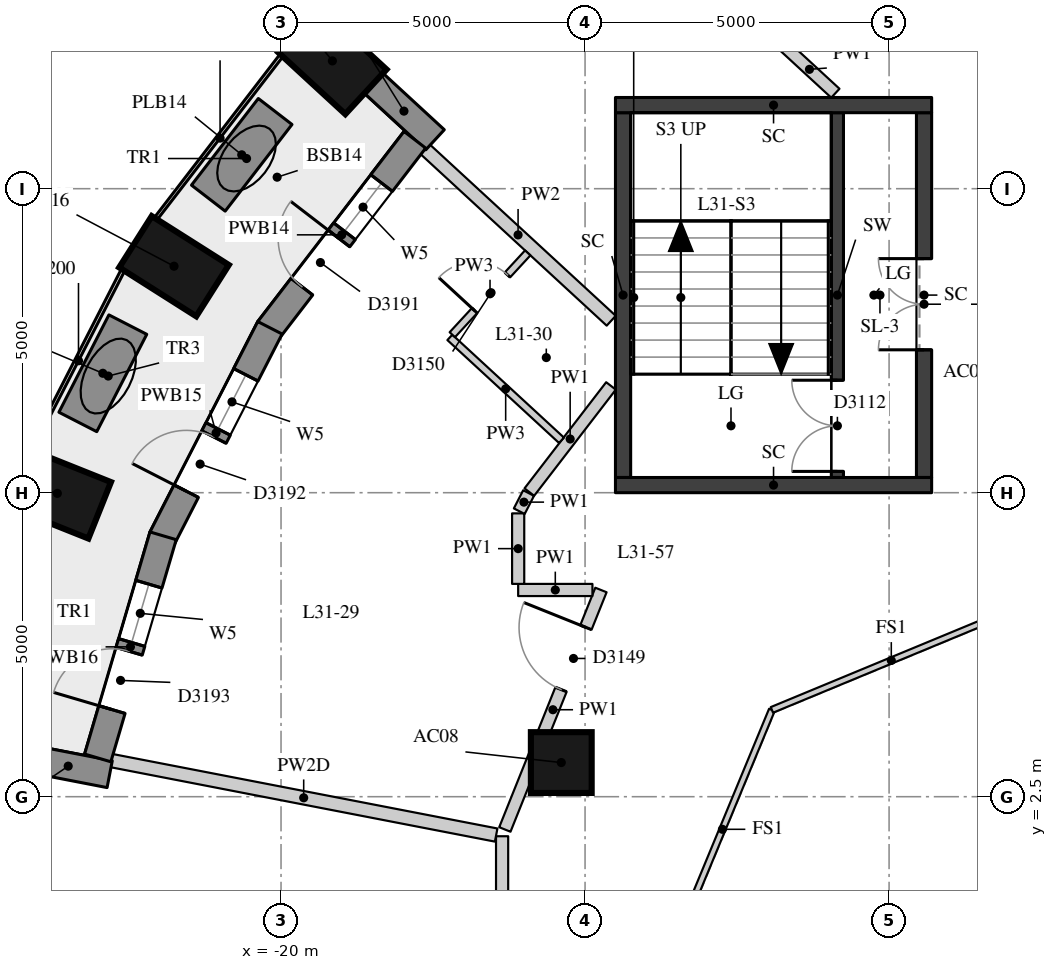
"""IFC4 building model, lengths in metres.
Left out: names, types, materials, properties, quantities, classifications, styles, units other than length and angle.
Written with IfcOpenShell. Run it as: python <this file> out.ifc"""

import sys

from ifc_helpers import new_model, si_unit, direction, frame, frame_2d, origin, origin_2d, place, context, subcontext, project, spatial, rectangle, extrude, element, fill, save


model = new_model("IFC4")
c1 = context("Model", 3, precision=1e-05, world=origin(), true_north=direction((0.0, 1.0)))
c2 = subcontext(c1, "Body", "Model", "MODEL_VIEW")
j1 = project(units=[si_unit("LENGTHUNIT", "METRE"), si_unit("PLANEANGLEUNIT", "RADIAN")], contexts=[c1])
p1 = place(None, origin())
s1 = spatial("IfcSite", under=j1, at=p1, CompositionType="ELEMENT")
p2 = place(p1, origin())
s2 = spatial("IfcBuilding", under=s1, at=p2, CompositionType="ELEMENT")
p3 = place(p2, frame((0.0, 0.0, 112.0)))
s3 = spatial("IfcBuildingStorey", under=s2, at=p3, CompositionType="ELEMENT", Elevation=112.0)
for number, where, z_axis, x_axis in (
    (1, (-19.156, 14.602, 0.0), (0.0, 0.0, 1.0), (-0.735, 0.678, 0.0)),
    (2, (-21.76, 11.225, 0.0), (0.0, 0.0, 1.0), (-0.845, 0.536, 0.0)),
    (3, (-23.679, 7.489, 0.0), (0.0, 0.0, 1.0), (-0.929, 0.371, 0.0)),
):
    element("IfcColumn", number, at=place(p3, frame(where, z_axis=z_axis, x_axis=x_axis)), inside=s3, PredefinedType="COLUMN", context=c2, shape_type="SweptSolid", body=[
        extrude(rectangle(XDim=1.5, YDim=1.0, at=origin_2d()), origin(), (0.0, 0.0, 1.0), 3.3),
    ])
p4 = place(p3, frame((-15.391, 3.062, 0.0), z_axis=(0.0, 0.0, 1.0), x_axis=(1.0, 0.0, 0.0)))
e4 = element("IfcColumn", 4, at=p4, inside=s3, PredefinedType="COLUMN", context=c2, shape_type="SweptSolid", body=[
    extrude(rectangle(XDim=1.0, YDim=1.0, at=origin_2d()), origin(), (0.0, 0.0, 1.0), 3.3),
])
p5 = place(p3, frame((-18.49, 14.247, 0.0), z_axis=(0.0, 0.0, 1.0), x_axis=(0.735307968822, -0.67773312667, 0.0)))
e5 = element("IfcWall", 5, at=p5, inside=s3, PredefinedType="SOLIDWALL", context=c2, shape_type="SweptSolid", body=[
    extrude(rectangle(XDim=1.391, YDim=0.45, at=frame_2d((0.695, 0.0))), origin(), (0.0, 0.0, 1.0), 3.02),
])
p6 = place(p3, frame((-24.183, 3.135, 0.0), z_axis=(0.0, 0.0, 1.0), x_axis=(0.981744955624, -0.190202108576, 0.0)))
e6 = element("IfcWall", 6, at=p6, inside=s3, PredefinedType="SOLIDWALL", context=c2, shape_type="SweptSolid", body=[
    extrude(rectangle(XDim=1.39, YDim=0.45, at=frame_2d((0.695, 0.0))), origin(), (0.0, 0.0, 1.0), 2.47),
])
p7 = place(p3, frame((-17.799, 13.304, 0.0), z_axis=(0.0, 0.0, 1.0), x_axis=(-0.609698797728, -0.792633191362, 0.0)))
e7 = element("IfcWall", 7, at=p7, inside=s3, PredefinedType="SOLIDWALL", context=c2, shape_type="SweptSolid", body=[
    extrude(rectangle(XDim=3.945, YDim=0.45, at=frame_2d((1.973, 0.0))), origin(), (0.0, 0.0, 1.0), 3.02),
])
p8 = place(p7, frame((0.897, 0.0, 0.4)))
e8 = element("IfcOpeningElement", 8, at=p8, cuts=e7, PredefinedType="OPENING", context=c2, shape_type="SweptSolid", body=[
    extrude(rectangle(XDim=1.0, YDim=1.75, at=frame_2d((0.5, 0.875))), frame((0.0, 0.235, 0.0), z_axis=(0.0, -1.0, 0.0), x_axis=(1.0, 0.0, 0.0)), (0.0, 0.0, 1.0), 0.47),
])
p9 = place(p7, frame((2.047, 0.0, 0.0)))
e9 = element("IfcOpeningElement", 9, at=p9, cuts=e7, PredefinedType="OPENING", context=c2, shape_type="SweptSolid", body=[
    extrude(rectangle(XDim=1.0, YDim=2.15, at=frame_2d((0.5, 1.075))), frame((0.0, 0.235, 0.0), z_axis=(0.0, -1.0, 0.0), x_axis=(1.0, 0.0, 0.0)), (0.0, 0.0, 1.0), 0.47),
])
p10 = place(p3, frame((-20.182, 10.212, 0.0), z_axis=(0.0, 0.0, 1.0), x_axis=(-0.455932890657, -0.890014156751, 0.0)))
e10 = element("IfcWall", 10, at=p10, inside=s3, PredefinedType="SOLIDWALL", context=c2, shape_type="SweptSolid", body=[
    extrude(rectangle(XDim=3.888, YDim=0.45, at=frame_2d((1.944, 0.0))), origin(), (0.0, 0.0, 1.0), 3.02),
])
p11 = place(p10, frame((0.869, 0.0, 0.4)))
e11 = element("IfcOpeningElement", 11, at=p11, cuts=e10, PredefinedType="OPENING", context=c2, shape_type="SweptSolid", body=[
    extrude(rectangle(XDim=1.0, YDim=1.75, at=frame_2d((0.5, 0.875))), frame((0.0, 0.235, 0.0), z_axis=(0.0, -1.0, 0.0), x_axis=(1.0, 0.0, 0.0)), (0.0, 0.0, 1.0), 0.47),
])
p12 = place(p10, frame((2.019, 0.0, 0.0)))
e12 = element("IfcOpeningElement", 12, at=p12, cuts=e10, PredefinedType="OPENING", context=c2, shape_type="SweptSolid", body=[
    extrude(rectangle(XDim=1.0, YDim=2.15, at=frame_2d((0.5, 1.075))), frame((0.0, 0.235, 0.0), z_axis=(0.0, -1.0, 0.0), x_axis=(1.0, 0.0, 0.0)), (0.0, 0.0, 1.0), 0.47),
])
p13 = place(p3, frame((-21.939, 6.791, 0.0), z_axis=(0.0, 0.0, 1.0), x_axis=(-0.282350284167, -0.959311376473, 0.0)))
e13 = element("IfcWall", 13, at=p13, inside=s3, PredefinedType="SOLIDWALL", context=c2, shape_type="SweptSolid", body=[
    extrude(rectangle(XDim=3.808, YDim=0.45, at=frame_2d((1.904, 0.0))), origin(), (0.0, 0.0, 1.0), 3.02),
])
p14 = place(p13, frame((0.829, 0.0, 0.4)))
e14 = element("IfcOpeningElement", 14, at=p14, cuts=e13, PredefinedType="OPENING", context=c2, shape_type="SweptSolid", body=[
    extrude(rectangle(XDim=1.0, YDim=1.75, at=frame_2d((0.5, 0.875))), frame((0.0, 0.235, 0.0), z_axis=(0.0, -1.0, 0.0), x_axis=(1.0, 0.0, 0.0)), (0.0, 0.0, 1.0), 0.47),
])
p15 = place(p13, frame((1.979, 0.0, 0.0)))
e15 = element("IfcOpeningElement", 15, at=p15, cuts=e13, PredefinedType="OPENING", context=c2, shape_type="SweptSolid", body=[
    extrude(rectangle(XDim=1.0, YDim=2.15, at=frame_2d((0.5, 1.075))), frame((0.0, 0.235, 0.0), z_axis=(0.0, -1.0, 0.0), x_axis=(1.0, 0.0, 0.0)), (0.0, 0.0, 1.0), 0.47),
])
p16 = place(p3, frame((-20.096, 13.77, 0.0), z_axis=(0.0, 0.0, 1.0), x_axis=(-0.610752434717, -0.791821610899, 0.0)))
e16 = element("IfcWall", 16, at=p16, inside=s3, PredefinedType="USERDEFINED", context=c2, shape_type="SweptSolid", body=[
    extrude(rectangle(XDim=1.8, YDim=0.7, at=frame_2d((0.9, 0.0))), origin(), (0.0, 0.0, 1.0), 0.75),
])
p17 = place(p3, frame((-22.52, 10.265, 0.0), z_axis=(0.0, 0.0, 1.0), x_axis=(-0.456845298981, -0.88954616114, 0.0)))
e17 = element("IfcWall", 17, at=p17, inside=s3, PredefinedType="USERDEFINED", context=c2, shape_type="SweptSolid", body=[
    extrude(rectangle(XDim=1.8, YDim=0.7, at=frame_2d((0.9, 0.0))), origin(), (0.0, 0.0, 1.0), 0.75),
])
p18 = place(p3, frame((-10.85, 7.75, 0.0), z_axis=(0.0, 0.0, 1.0), x_axis=(0.0, 1.0, 0.0)))
e18 = element("IfcWall", 18, at=p18, inside=s3, PredefinedType="SHEAR", context=c2, shape_type="SweptSolid", body=[
    extrude(rectangle(XDim=6.0, YDim=0.2, at=frame_2d((3.0, 0.0))), origin(), (0.0, 0.0, 1.0), 3.02),
])
p19 = place(p18, frame((0.1, 0.0, 0.0)))
e19 = element("IfcOpeningElement", 19, at=p19, cuts=e18, PredefinedType="OPENING", context=c2, shape_type="SweptSolid", body=[
    extrude(rectangle(XDim=1.5, YDim=2.1, at=frame_2d((0.75, 1.05))), frame((0.0, 0.11, 0.0), z_axis=(0.0, -1.0, 0.0), x_axis=(1.0, 0.0, 0.0)), (0.0, 0.0, 1.0), 0.22),
])
p20 = place(p3, frame((-14.375, 7.75, -0.28), z_axis=(0.0, 0.0, 1.0), x_axis=(0.0, 1.0, 0.0)))
e20 = element("IfcWall", 20, at=p20, inside=s3, PredefinedType="SHEAR", context=c2, shape_type="SweptSolid", body=[
    extrude(rectangle(XDim=6.0, YDim=0.25, at=frame_2d((3.0, 0.0))), origin(), (0.0, 0.0, 1.0), 3.3),
])
p21 = place(p3, frame((-9.425, 7.75, -0.28), z_axis=(0.0, 0.0, 1.0), x_axis=(0.0, 1.0, 0.0)))
e21 = element("IfcWall", 21, at=p21, inside=s3, PredefinedType="SHEAR", context=c2, shape_type="SweptSolid", body=[
    extrude(rectangle(XDim=6.0, YDim=0.25, at=frame_2d((3.0, 0.0))), origin(), (0.0, 0.0, 1.0), 3.3),
])
p22 = place(p21, frame((2.1, 0.0, 0.28)))
e22 = element("IfcOpeningElement", 22, at=p22, cuts=e21, PredefinedType="OPENING", context=c2, shape_type="SweptSolid", body=[
    extrude(rectangle(XDim=1.5, YDim=2.1, at=frame_2d((0.75, 1.05))), frame((0.0, 0.135, 0.0), z_axis=(0.0, -1.0, 0.0), x_axis=(1.0, 0.0, 0.0)), (0.0, 0.0, 1.0), 0.27),
])
for number, where, z_axis, x_axis in (
    (23, (-14.5, 13.875, -0.28), (0.0, 0.0, 1.0), (1.0, 0.0, 0.0)),
    (24, (-14.5, 7.625, -0.28), (0.0, 0.0, 1.0), (1.0, 0.0, 0.0)),
):
    element("IfcWall", number, at=place(p3, frame(where, z_axis=z_axis, x_axis=x_axis)), inside=s3, PredefinedType="SHEAR", context=c2, shape_type="SweptSolid", body=[
        extrude(rectangle(XDim=5.2, YDim=0.25, at=frame_2d((2.6, 0.0))), origin(), (0.0, 0.0, 1.0), 3.3),
    ])
p23 = place(p3, frame((-16.364, -2.95, 0.0), z_axis=(0.0, 0.0, 1.0), x_axis=(0.0, 1.0, 0.0)))
e25 = element("IfcWall", 25, at=p23, inside=s3, PredefinedType="PARTITIONING", context=c2, shape_type="SweptSolid", body=[
    extrude(rectangle(XDim=4.799, YDim=0.2, at=frame_2d((2.4, 0.0))), origin(), (0.0, 0.0, 1.0), 2.52),
])
p24 = place(p23, frame((0.835, 0.0, 0.0)))
e26 = element("IfcOpeningElement", 26, at=p24, cuts=e25, PredefinedType="OPENING", context=c2, shape_type="SweptSolid", body=[
    extrude(rectangle(XDim=0.9, YDim=2.1, at=frame_2d((0.45, 1.05))), frame((0.0, 0.11, 0.0), z_axis=(0.0, -1.0, 0.0), x_axis=(1.0, 0.0, 0.0)), (0.0, 0.0, 1.0), 0.22),
])
p25 = place(p3, frame((-16.319, 1.961, 0.0), z_axis=(0.0, 0.0, 1.0), x_axis=(0.372352515432, 0.928091377102, 0.0)))
e27 = element("IfcWall", 27, at=p25, inside=s3, PredefinedType="PARTITIONING", context=c2, shape_type="SweptSolid", body=[
    extrude(rectangle(XDim=4.244, YDim=0.2, at=frame_2d((2.122, 0.0))), origin(), (0.0, 0.0, 1.0), 3.02),
])
p26 = place(p25, frame((2.481, 0.0, 0.0)))
e28 = element("IfcOpeningElement", 28, at=p26, cuts=e27, PredefinedType="OPENING", context=c2, shape_type="SweptSolid", body=[
    extrude(rectangle(XDim=1.1, YDim=2.1, at=frame_2d((0.55, 1.05))), frame((0.0, 0.11, 0.0), z_axis=(0.0, -1.0, 0.0), x_axis=(1.0, 0.0, 0.0)), (0.0, 0.0, 1.0), 0.22),
])
p27 = place(p3, frame((-14.879, 5.9, 0.0), z_axis=(0.0, 0.0, 1.0), x_axis=(-1.0, 0.0, 0.0)))
e29 = element("IfcWall", 29, at=p27, inside=s3, PredefinedType="PARTITIONING", context=c2, shape_type="SweptSolid", body=[
    extrude(rectangle(XDim=1.221, YDim=0.2, at=frame_2d((0.611, 0.0))), origin(), (0.0, 0.0, 1.0), 3.02),
])
p28 = place(p3, frame((-16.1, 6.0, 0.0), z_axis=(0.0, 0.0, 1.0), x_axis=(0.0, 1.0, 0.0)))
e30 = element("IfcWall", 30, at=p28, inside=s3, PredefinedType="PARTITIONING", context=c2, shape_type="SweptSolid", body=[
    extrude(rectangle(XDim=1.16, YDim=0.2, at=frame_2d((0.58, 0.0))), origin(), (0.0, 0.0, 1.0), 3.02),
])
p29 = place(p3, frame((-16.082, 7.196, 0.0), z_axis=(0.0, 0.0, 1.0), x_axis=(0.456789128428, 0.889575006478, 0.0)))
e31 = element("IfcWall", 31, at=p29, inside=s3, PredefinedType="PARTITIONING", context=c2, shape_type="SweptSolid", body=[
    extrude(rectangle(XDim=0.336, YDim=0.2, at=frame_2d((0.168, 0.0))), origin(), (0.0, 0.0, 1.0), 3.02),
])
p30 = place(p3, frame((-15.917, 7.51, 0.0), z_axis=(0.0, 0.0, 1.0), x_axis=(0.609673267649, 0.792652828617, 0.0)))
e32 = element("IfcWall", 32, at=p30, inside=s3, PredefinedType="PARTITIONING", context=c2, shape_type="SweptSolid", body=[
    extrude(rectangle(XDim=2.203, YDim=0.2, at=frame_2d((1.102, 0.0))), origin(), (0.0, 0.0, 1.0), 3.02),
])
p31 = place(p3, frame((-10.883, 14.07, 0.0), z_axis=(0.0, 0.0, 1.0), x_axis=(-0.735263405477, 0.677781472575, 0.0)))
e33 = element("IfcWall", 33, at=p31, inside=s3, PredefinedType="PARTITIONING", context=c2, shape_type="SweptSolid", body=[
    extrude(rectangle(XDim=1.159, YDim=0.2, at=frame_2d((0.58, 0.0))), origin(), (0.0, 0.0, 1.0), 3.02),
])
p32 = place(p3, frame((-17.633, 13.151, 0.0), z_axis=(0.0, 0.0, 1.0), x_axis=(0.73535370522, -0.677683501511, 0.0)))
e34 = element("IfcWall", 34, at=p32, inside=s3, PredefinedType="PARTITIONING", context=c2, shape_type="SweptSolid", body=[
    extrude(rectangle(XDim=4.166, YDim=0.22, at=frame_2d((2.083, 0.0))), origin(), (0.0, 0.0, 1.0), 3.02),
])
p33 = place(p3, frame((-22.793, 3.095, 0.0), z_axis=(0.0, 0.0, 1.0), x_axis=(0.981772102901, -0.190061931918, 0.0)))
e35 = element("IfcWall", 35, at=p33, inside=s3, PredefinedType="PARTITIONING", context=c2, shape_type="SweptSolid", body=[
    extrude(rectangle(XDim=6.448, YDim=0.22, at=frame_2d((3.224, 0.0))), origin(), (0.0, 0.0, 1.0), 2.47),
])
p34 = place(p3, frame((-15.387, 8.362, 0.0), z_axis=(0.0, 0.0, 1.0), x_axis=(-0.735313004993, 0.677727662626, 0.0)))
e36 = element("IfcWall", 36, at=p34, inside=s3, PredefinedType="PARTITIONING", context=c2, shape_type="SweptSolid", body=[
    extrude(rectangle(XDim=2.497, YDim=0.12, at=frame_2d((1.249, 0.0))), origin(), (0.0, 0.0, 1.0), 3.02),
])
p35 = place(p3, frame((-17.183, 10.098, 0.0), z_axis=(0.0, 0.0, 1.0), x_axis=(0.677631502542, 0.735401622763, 0.0)))
e37 = element("IfcWall", 37, at=p35, inside=s3, PredefinedType="PARTITIONING", context=c2, shape_type="SweptSolid", body=[
    extrude(rectangle(XDim=1.83, YDim=0.12, at=frame_2d((0.915, 0.0))), origin(), (0.0, 0.0, 1.0), 3.02),
])
p36 = place(p35, frame((0.54, 0.0, 0.0)))
e38 = element("IfcOpeningElement", 38, at=p36, cuts=e37, PredefinedType="OPENING", context=c2, shape_type="SweptSolid", body=[
    extrude(rectangle(XDim=0.8, YDim=2.1, at=frame_2d((0.4, 1.05))), frame((0.0, 0.07, 0.0), z_axis=(0.0, -1.0, 0.0), x_axis=(1.0, 0.0, 0.0)), (0.0, 0.0, 1.0), 0.14),
])
for number, where, z_axis, x_axis in (
    (39, (-13.554, 0.0, 0.0), (0.0, 0.0, 1.0), (0.383, 0.924, 0.0)),
    (40, (-11.927, 3.927, 0.0), (0.0, 0.0, 1.0), (0.924, 0.383, 0.0)),
):
    element("IfcWall", number, at=place(p3, frame(where, z_axis=z_axis, x_axis=x_axis)), inside=s3, PredefinedType="PARTITIONING", context=c2, shape_type="SweptSolid", body=[
        extrude(rectangle(XDim=4.251, YDim=0.1, at=frame_2d((2.125, 0.0))), origin(), (0.0, 0.0, 1.0), 3.02),
    ])
p37 = place(p8, origin())
e41 = element("IfcWindow", 41, at=p37, inside=s3, PartitioningType="SINGLE_PANEL", PredefinedType="WINDOW", context=c2, shape_type="SweptSolid", body=[
    extrude(rectangle(XDim=1.0, YDim=1.75, at=frame_2d((0.5, 0.875))), frame((0.0, 0.035, 0.0), z_axis=(0.0, -1.0, 0.0), x_axis=(1.0, 0.0, 0.0)), (0.0, 0.0, 1.0), 0.06),
])
fill(e8, e41)
p38 = place(p9, frame((1.0, 0.0, 0.0), z_axis=(0.0, 0.0, 1.0), x_axis=(-1.0, 0.0, 0.0)))
e42 = element("IfcDoor", 42, at=p38, inside=s3, OperationType="SINGLE_SWING_RIGHT", PredefinedType="DOOR", context=c2, shape_type="SweptSolid", body=[
    extrude(rectangle(XDim=1.0, YDim=2.15, at=frame_2d((0.5, 1.075))), frame((0.0, 0.075, 0.0), z_axis=(0.0, -1.0, 0.0), x_axis=(1.0, 0.0, 0.0)), (0.0, 0.0, 1.0), 0.05),
])
fill(e9, e42)
p39 = place(p11, origin())
e43 = element("IfcWindow", 43, at=p39, inside=s3, PartitioningType="SINGLE_PANEL", PredefinedType="WINDOW", context=c2, shape_type="SweptSolid", body=[
    extrude(rectangle(XDim=1.0, YDim=1.75, at=frame_2d((0.5, 0.875))), frame((0.0, 0.035, 0.0), z_axis=(0.0, -1.0, 0.0), x_axis=(1.0, 0.0, 0.0)), (0.0, 0.0, 1.0), 0.06),
])
fill(e11, e43)
p40 = place(p12, frame((1.0, 0.0, 0.0), z_axis=(0.0, 0.0, 1.0), x_axis=(-1.0, 0.0, 0.0)))
e44 = element("IfcDoor", 44, at=p40, inside=s3, OperationType="SINGLE_SWING_LEFT", PredefinedType="DOOR", context=c2, shape_type="SweptSolid", body=[
    extrude(rectangle(XDim=1.0, YDim=2.15, at=frame_2d((0.5, 1.075))), frame((0.0, 0.075, 0.0), z_axis=(0.0, -1.0, 0.0), x_axis=(1.0, 0.0, 0.0)), (0.0, 0.0, 1.0), 0.05),
])
fill(e12, e44)
p41 = place(p14, origin())
e45 = element("IfcWindow", 45, at=p41, inside=s3, PartitioningType="SINGLE_PANEL", PredefinedType="WINDOW", context=c2, shape_type="SweptSolid", body=[
    extrude(rectangle(XDim=1.0, YDim=1.75, at=frame_2d((0.5, 0.875))), frame((0.0, 0.035, 0.0), z_axis=(0.0, -1.0, 0.0), x_axis=(1.0, 0.0, 0.0)), (0.0, 0.0, 1.0), 0.06),
])
fill(e14, e45)
p42 = place(p15, frame((1.0, 0.0, 0.0), z_axis=(0.0, 0.0, 1.0), x_axis=(-1.0, 0.0, 0.0)))
e46 = element("IfcDoor", 46, at=p42, inside=s3, OperationType="SINGLE_SWING_LEFT", PredefinedType="DOOR", context=c2, shape_type="SweptSolid", body=[
    extrude(rectangle(XDim=1.0, YDim=2.15, at=frame_2d((0.5, 1.075))), frame((0.0, 0.075, 0.0), z_axis=(0.0, -1.0, 0.0), x_axis=(1.0, 0.0, 0.0)), (0.0, 0.0, 1.0), 0.05),
])
fill(e15, e46)
p43 = place(p19, origin())
e47 = element("IfcDoor", 47, at=p43, inside=s3, OperationType="DOUBLE_DOOR_SINGLE_SWING", PredefinedType="DOOR", context=c2, shape_type="SweptSolid", body=[
    extrude(rectangle(XDim=1.5, YDim=2.1, at=frame_2d((0.75, 1.05))), frame((0.0, 0.025, 0.0), z_axis=(0.0, -1.0, 0.0), x_axis=(1.0, 0.0, 0.0)), (0.0, 0.0, 1.0), 0.05),
])
fill(e19, e47)
p44 = place(p22, origin())
e48 = element("IfcDoor", 48, at=p44, inside=s3, OperationType="DOUBLE_DOOR_SINGLE_SWING", PredefinedType="DOOR", context=c2, shape_type="SweptSolid", body=[
    extrude(rectangle(XDim=1.5, YDim=2.1, at=frame_2d((0.75, 1.05))), frame((0.0, 0.025, 0.0), z_axis=(0.0, -1.0, 0.0), x_axis=(1.0, 0.0, 0.0)), (0.0, 0.0, 1.0), 0.05),
])
fill(e22, e48)
p45 = place(p26, origin())
e49 = element("IfcDoor", 49, at=p45, inside=s3, OperationType="SINGLE_SWING_RIGHT", PredefinedType="DOOR", context=c2, shape_type="SweptSolid", body=[
    extrude(rectangle(XDim=1.1, YDim=2.1, at=frame_2d((0.55, 1.05))), frame((0.0, 0.025, 0.0), z_axis=(0.0, -1.0, 0.0), x_axis=(1.0, 0.0, 0.0)), (0.0, 0.0, 1.0), 0.05),
])
fill(e28, e49)
p46 = place(p36, origin())
e50 = element("IfcDoor", 50, at=p46, inside=s3, OperationType="SINGLE_SWING_LEFT", PredefinedType="DOOR", context=c2, shape_type="SweptSolid", body=[
    extrude(rectangle(XDim=0.8, YDim=2.1, at=frame_2d((0.4, 1.05))), frame((0.0, 0.025, 0.0), z_axis=(0.0, -1.0, 0.0), x_axis=(1.0, 0.0, 0.0)), (0.0, 0.0, 1.0), 0.05),
])
fill(e38, e50)
save(model, sys.argv[1])
